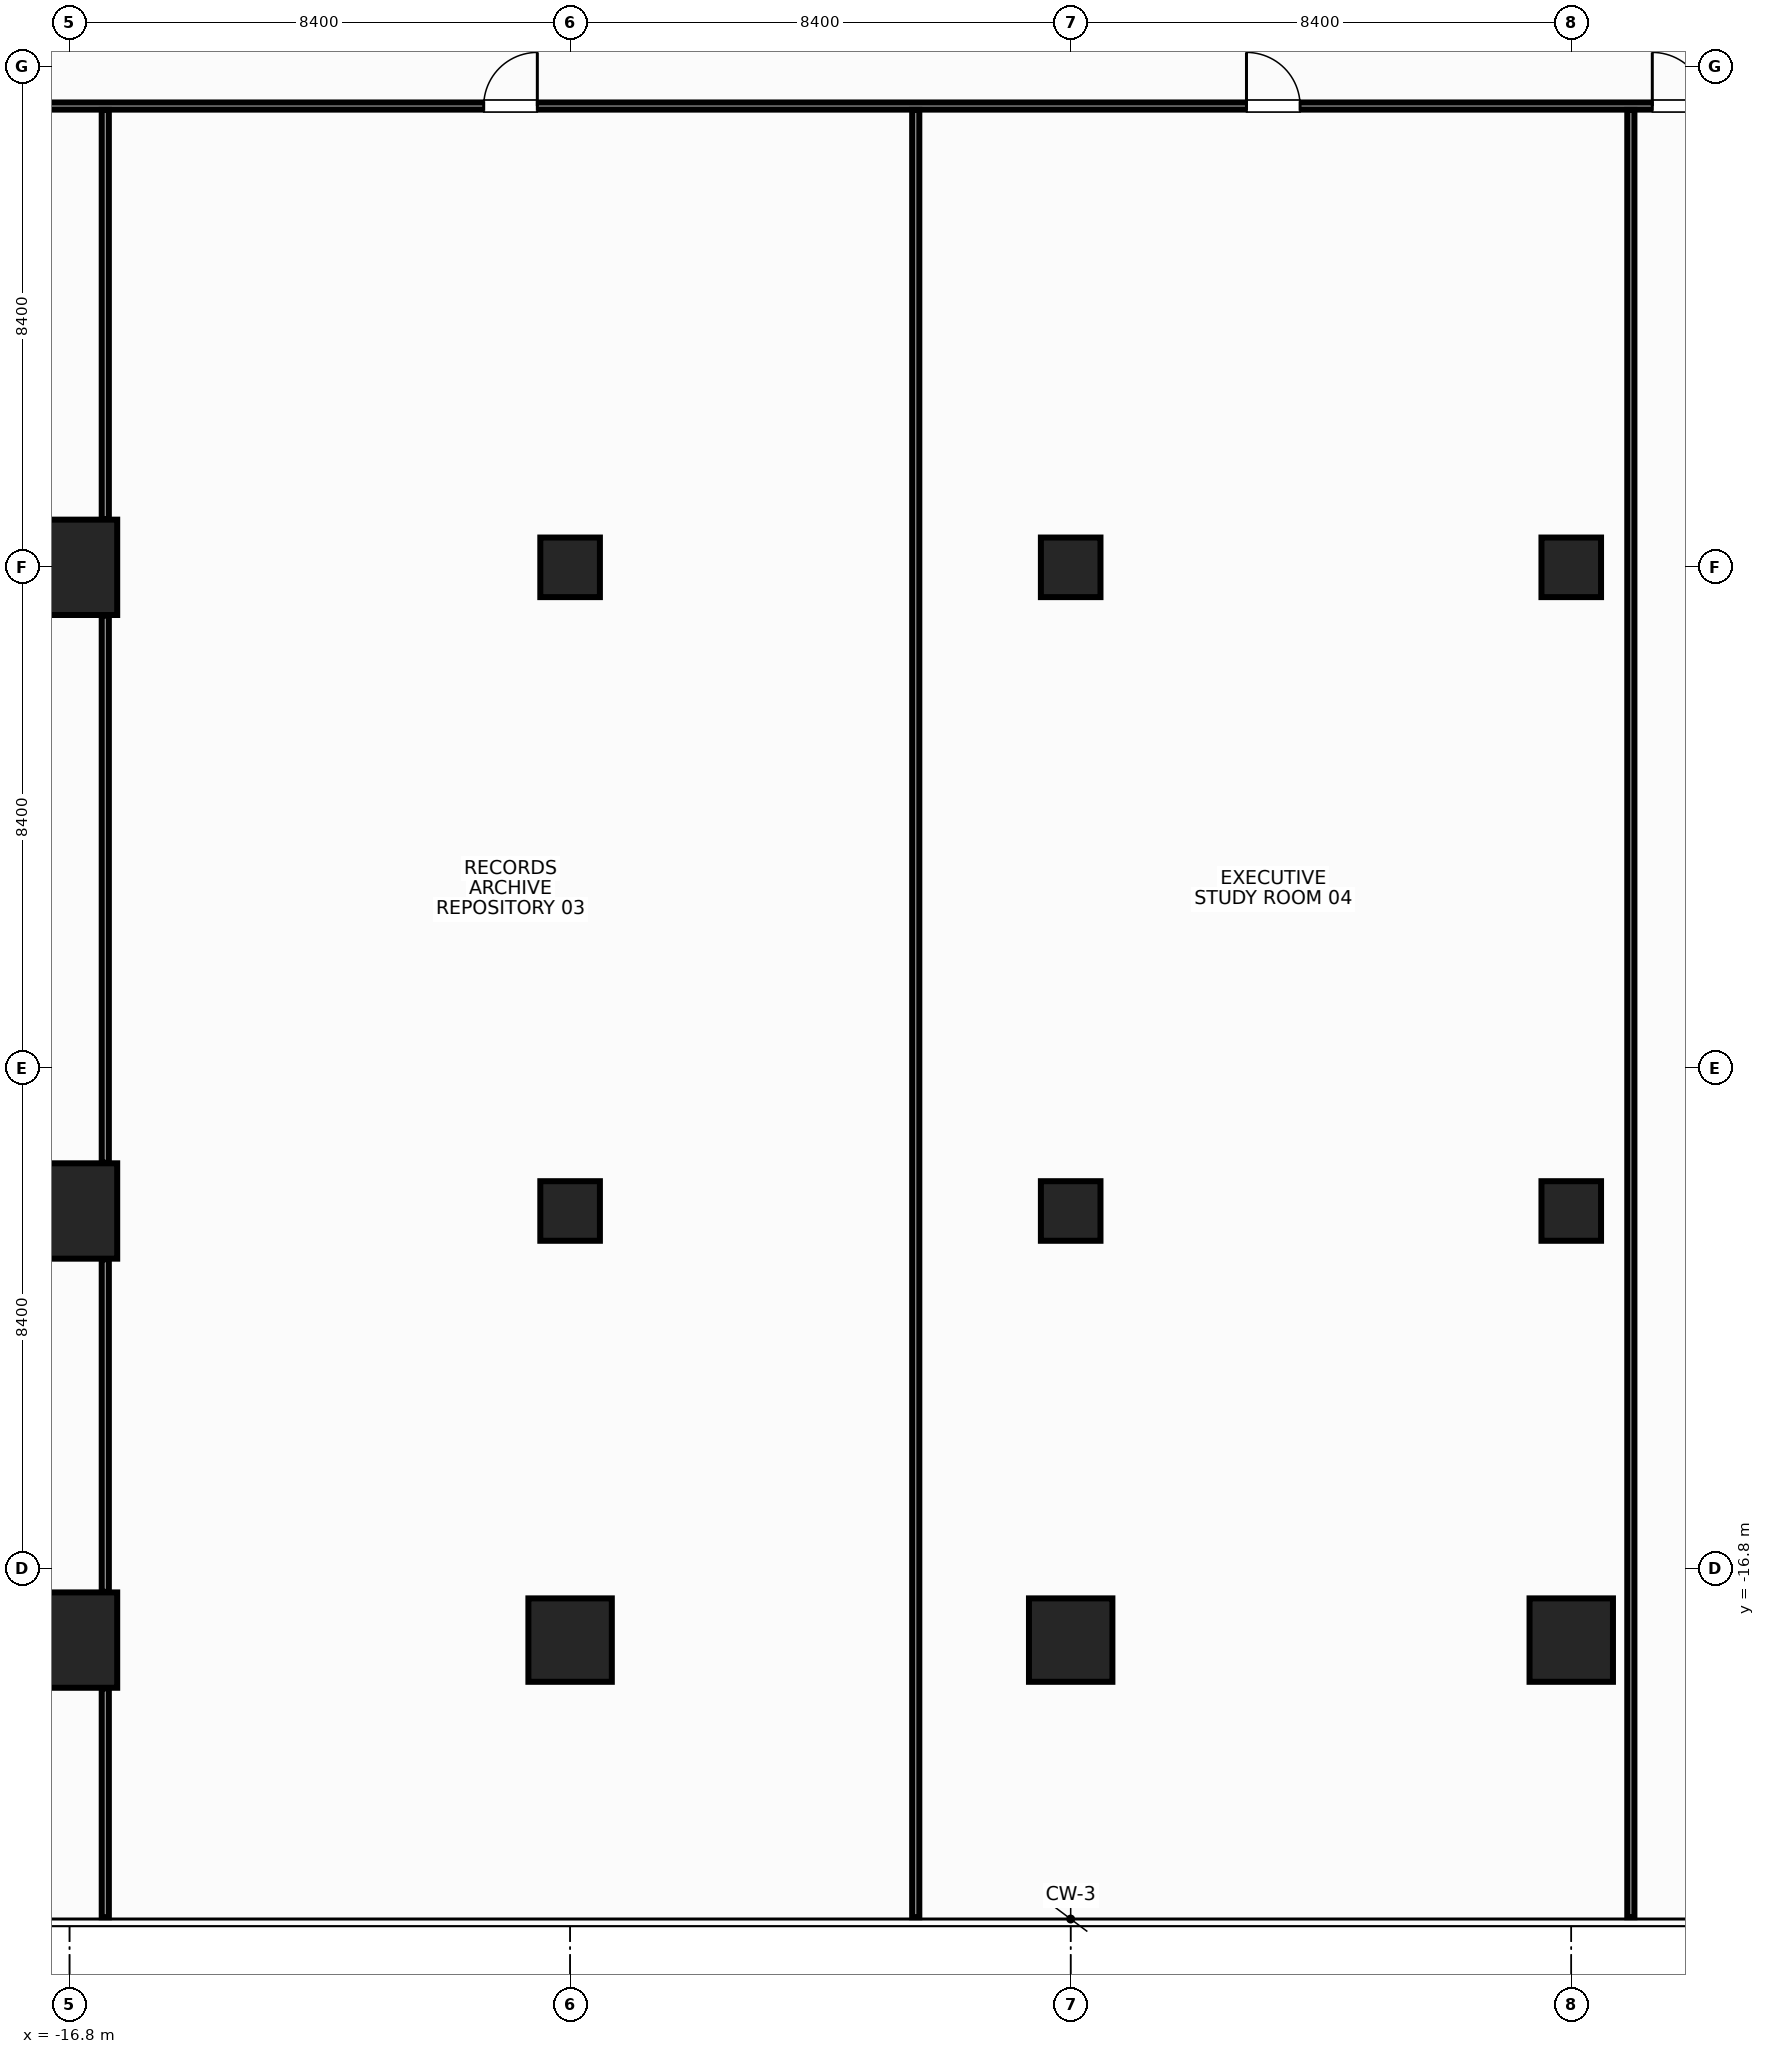
"""IFC4 building model, lengths in metres.
Left out: names, types, materials, properties, quantities, classifications, styles, units other than length and angle.
Written with IfcOpenShell. Run it as: python <this file> out.ifc"""

import sys

from ifc_helpers import new_model, si_unit, direction, frame, frame_2d, origin, origin_2d, place, context, subcontext, project, spatial, rectangle, hollow_rectangle, extrude, source, transform, mapped, element, fill, save


model = new_model("IFC4")
c1 = context("Model", 3, precision=1e-05, world=origin(), true_north=direction((0.0, 1.0)))
c2 = subcontext(c1, "Body", "Model", "MODEL_VIEW")
j1 = project(units=[si_unit("LENGTHUNIT", "METRE"), si_unit("PLANEANGLEUNIT", "RADIAN")], contexts=[c1])
p1 = place(None, origin())
s1 = spatial("IfcSite", under=j1, at=p1, CompositionType="ELEMENT")
p2 = place(p1, origin())
s2 = spatial("IfcBuilding", under=s1, at=p2, CompositionType="ELEMENT")
p3 = place(p2, frame((0.0, 0.0, 135.2)))
s3 = spatial("IfcBuildingStorey", under=s2, at=p3, CompositionType="ELEMENT", Elevation=135.2)
m1 = source(origin(), c2, "Body", "SweptSolid", [
    extrude(rectangle(XDim=1.6, YDim=1.6, at=origin_2d()), origin(), (0.0, 0.0, 1.0), 3.6),
])
for number, where, z_axis, x_axis in (
    (1, (-16.8, -18.0, 0.0), (0.0, 0.0, 1.0), (1.0, 0.0, 0.0)),
    (2, (-16.8, -10.8, 0.0), (0.0, 0.0, 1.0), (1.0, 0.0, 0.0)),
    (3, (-16.8, 0.0, 0.0), (0.0, 0.0, 1.0), (1.0, 0.0, 0.0)),
):
    element("IfcColumn", number, at=place(p3, frame(where, z_axis=z_axis, x_axis=x_axis)), inside=s3, PredefinedType="COLUMN", context=c2, shape_type="MappedRepresentation", body=[
        mapped(m1, transform((0.0, 0.0, 0.0), x_axis=(1.0, 0.0, 0.0), y_axis=(0.0, 1.0, 0.0), z_axis=(0.0, 0.0, 1.0), scale=1.0)),
    ])
m2 = source(origin(), c2, "Body", "SweptSolid", [
    extrude(rectangle(XDim=1.4, YDim=1.4, at=origin_2d()), origin(), (0.0, 0.0, 1.0), 3.6),
])
p4 = place(p3, frame((-8.4, -18.0, 0.0), z_axis=(0.0, 0.0, 1.0), x_axis=(1.0, 0.0, 0.0)))
e4 = element("IfcColumn", 4, at=p4, inside=s3, PredefinedType="COLUMN", context=c2, shape_type="MappedRepresentation", body=[
    mapped(m2, transform((0.0, 0.0, 0.0), x_axis=(1.0, 0.0, 0.0), y_axis=(0.0, 1.0, 0.0), z_axis=(0.0, 0.0, 1.0), scale=1.0)),
])
m3 = source(origin(), c2, "Body", "SweptSolid", [
    extrude(hollow_rectangle(XDim=1.0, YDim=1.0, WallThickness=0.045, at=origin_2d()), origin(), (0.0, 0.0, 1.0), 3.6),
])
for number, where, z_axis, x_axis in (
    (5, (-8.4, 0.0, 0.0), (0.0, 0.0, 1.0), (1.0, 0.0, 0.0)),
    (6, (-8.4, -10.8, 0.0), (0.0, 0.0, 1.0), (1.0, 0.0, 0.0)),
):
    element("IfcColumn", number, at=place(p3, frame(where, z_axis=z_axis, x_axis=x_axis)), inside=s3, PredefinedType="COLUMN", context=c2, shape_type="MappedRepresentation", body=[
        mapped(m3, transform((0.0, 0.0, 0.0), x_axis=(1.0, 0.0, 0.0), y_axis=(0.0, 1.0, 0.0), z_axis=(0.0, 0.0, 1.0), scale=1.0)),
    ])
p5 = place(p3, frame((8.4, -18.0, 0.0), z_axis=(0.0, 0.0, 1.0), x_axis=(1.0, 0.0, 0.0)))
e7 = element("IfcColumn", 7, at=p5, inside=s3, PredefinedType="COLUMN", context=c2, shape_type="MappedRepresentation", body=[
    mapped(m2, transform((0.0, 0.0, 0.0), x_axis=(1.0, 0.0, 0.0), y_axis=(0.0, 1.0, 0.0), z_axis=(0.0, 0.0, 1.0), scale=1.0)),
])
for number, where, z_axis, x_axis in (
    (8, (8.4, 0.0, 0.0), (0.0, 0.0, 1.0), (1.0, 0.0, 0.0)),
    (9, (8.4, -10.8, 0.0), (0.0, 0.0, 1.0), (1.0, 0.0, 0.0)),
):
    element("IfcColumn", number, at=place(p3, frame(where, z_axis=z_axis, x_axis=x_axis)), inside=s3, PredefinedType="COLUMN", context=c2, shape_type="MappedRepresentation", body=[
        mapped(m3, transform((0.0, 0.0, 0.0), x_axis=(1.0, 0.0, 0.0), y_axis=(0.0, 1.0, 0.0), z_axis=(0.0, 0.0, 1.0), scale=1.0)),
    ])
p6 = place(p3, frame((0.0, -18.0, 0.0), z_axis=(0.0, 0.0, 1.0), x_axis=(1.0, 0.0, 0.0)))
e10 = element("IfcColumn", 10, at=p6, inside=s3, PredefinedType="COLUMN", context=c2, shape_type="MappedRepresentation", body=[
    mapped(m2, transform((0.0, 0.0, 0.0), x_axis=(1.0, 0.0, 0.0), y_axis=(0.0, 1.0, 0.0), z_axis=(0.0, 0.0, 1.0), scale=1.0)),
])
m4 = source(origin(), c2, "Body", "SweptSolid", [
    extrude(rectangle(XDim=1.0, YDim=1.0, at=origin_2d()), origin(), (0.0, 0.0, 1.0), 3.6),
])
for number, where, z_axis, x_axis in (
    (11, (0.0, -10.8, 0.0), (0.0, 0.0, 1.0), (1.0, 0.0, 0.0)),
    (12, (0.0, 0.0, 0.0), (0.0, 0.0, 1.0), (1.0, 0.0, 0.0)),
):
    element("IfcColumn", number, at=place(p3, frame(where, z_axis=z_axis, x_axis=x_axis)), inside=s3, PredefinedType="COLUMN", context=c2, shape_type="MappedRepresentation", body=[
        mapped(m4, transform((0.0, 0.0, 0.0), x_axis=(1.0, 0.0, 0.0), y_axis=(0.0, 1.0, 0.0), z_axis=(0.0, 0.0, 1.0), scale=1.0)),
    ])
m5 = source(origin(), c2, "Body", "SweptSolid", [
    extrude(rectangle(XDim=31.6, YDim=0.12, at=frame_2d((15.8, 0.0))), origin(), (0.0, 0.0, 1.0), 2.765),
])
p7 = place(p3, frame((-20.52, 7.74, 0.0), z_axis=(0.0, 0.0, 1.0), x_axis=(1.0, 0.0, 0.0)))
e13 = element("IfcWall", 13, at=p7, inside=s3, PredefinedType="PARTITIONING", context=c2, shape_type="MappedRepresentation", body=[
    mapped(m5, transform((0.0, 0.0, 0.0), x_axis=(1.0, 0.0, 0.0), y_axis=(0.0, 1.0, 0.0), z_axis=(0.0, 0.0, 1.0), scale=1.0)),
])
p8 = place(p7, frame((1.74, 0.0, 0.0)))
e14 = element("IfcOpeningElement", 14, at=p8, cuts=e13, PredefinedType="OPENING", context=c2, shape_type="SweptSolid", body=[
    extrude(rectangle(XDim=0.9, YDim=2.15, at=frame_2d((0.45, 1.075))), frame((0.0, 0.072, 0.0), z_axis=(0.0, -1.0, 0.0), x_axis=(1.0, 0.0, 0.0)), (0.0, 0.0, 1.0), 0.144),
])
p9 = place(p7, frame((30.28, 0.0, 0.0)))
e15 = element("IfcOpeningElement", 15, at=p9, cuts=e13, PredefinedType="OPENING", context=c2, shape_type="SweptSolid", body=[
    extrude(rectangle(XDim=0.9, YDim=2.15, at=frame_2d((0.45, 1.075))), frame((0.0, 0.072, 0.0), z_axis=(0.0, -1.0, 0.0), x_axis=(1.0, 0.0, 0.0)), (0.0, 0.0, 1.0), 0.144),
])
p10 = place(p7, frame((10.67, 0.0, 0.0)))
e16 = element("IfcOpeningElement", 16, at=p10, cuts=e13, PredefinedType="OPENING", context=c2, shape_type="SweptSolid", body=[
    extrude(rectangle(XDim=0.9, YDim=2.15, at=frame_2d((0.45, 1.075))), frame((0.0, 0.072, 0.0), z_axis=(0.0, -1.0, 0.0), x_axis=(1.0, 0.0, 0.0)), (0.0, 0.0, 1.0), 0.144),
])
p11 = place(p7, frame((23.47, 0.0, 0.0)))
e17 = element("IfcOpeningElement", 17, at=p11, cuts=e13, PredefinedType="OPENING", context=c2, shape_type="SweptSolid", body=[
    extrude(rectangle(XDim=0.9, YDim=2.15, at=frame_2d((0.45, 1.075))), frame((0.0, 0.072, 0.0), z_axis=(0.0, -1.0, 0.0), x_axis=(1.0, 0.0, 0.0)), (0.0, 0.0, 1.0), 0.144),
])
m6 = source(origin(), c2, "Body", "SweptSolid", [
    extrude(rectangle(XDim=3.84, YDim=0.12, at=frame_2d((1.92, 0.0))), origin(), (0.0, 0.0, 1.0), 3.38),
])
p12 = place(p3, frame((-16.2, -22.65, 0.0), z_axis=(0.0, 0.0, 1.0), x_axis=(0.0, 1.0, 0.0)))
e18 = element("IfcWall", 18, at=p12, inside=s3, PredefinedType="PARTITIONING", context=c2, shape_type="MappedRepresentation", body=[
    mapped(m6, transform((0.0, 0.0, 0.0), x_axis=(1.0, 0.0, 0.0), y_axis=(0.0, 1.0, 0.0), z_axis=(0.0, 0.0, 1.0), scale=1.0)),
])
m7 = source(origin(), c2, "Body", "SweptSolid", [
    extrude(rectangle(XDim=5.58, YDim=0.12, at=frame_2d((2.79, 0.0))), origin(), (0.0, 0.0, 1.0), 3.38),
])
p13 = place(p3, frame((-16.2, -17.19, 0.0), z_axis=(0.0, 0.0, 1.0), x_axis=(0.0, 1.0, 0.0)))
e19 = element("IfcWall", 19, at=p13, inside=s3, PredefinedType="PARTITIONING", context=c2, shape_type="MappedRepresentation", body=[
    mapped(m7, transform((0.0, 0.0, 0.0), x_axis=(1.0, 0.0, 0.0), y_axis=(0.0, 1.0, 0.0), z_axis=(0.0, 0.0, 1.0), scale=1.0)),
])
m8 = source(origin(), c2, "Body", "SweptSolid", [
    extrude(rectangle(XDim=9.18, YDim=0.12, at=frame_2d((4.59, 0.0))), origin(), (0.0, 0.0, 1.0), 3.38),
])
p14 = place(p3, frame((-16.2, -9.99, 0.0), z_axis=(0.0, 0.0, 1.0), x_axis=(0.0, 1.0, 0.0)))
e20 = element("IfcWall", 20, at=p14, inside=s3, PredefinedType="PARTITIONING", context=c2, shape_type="MappedRepresentation", body=[
    mapped(m8, transform((0.0, 0.0, 0.0), x_axis=(1.0, 0.0, 0.0), y_axis=(0.0, 1.0, 0.0), z_axis=(0.0, 0.0, 1.0), scale=1.0)),
])
m9 = source(origin(), c2, "Body", "SweptSolid", [
    extrude(rectangle(XDim=6.865, YDim=0.12, at=frame_2d((3.433, 0.0))), origin(), (0.0, 0.0, 1.0), 2.665),
])
p15 = place(p3, frame((-16.2, 0.81, 0.0), z_axis=(0.0, 0.0, 1.0), x_axis=(0.0, 1.0, 0.0)))
e21 = element("IfcWall", 21, at=p15, inside=s3, PredefinedType="PARTITIONING", context=c2, shape_type="MappedRepresentation", body=[
    mapped(m9, transform((0.0, 0.0, 0.0), x_axis=(1.0, 0.0, 0.0), y_axis=(0.0, 1.0, 0.0), z_axis=(0.0, 0.0, 1.0), scale=1.0)),
])
m10 = source(origin(), c2, "Body", "SweptSolid", [
    extrude(rectangle(XDim=30.325, YDim=0.12, at=frame_2d((15.163, 0.0))), origin(), (0.0, 0.0, 1.0), 2.665),
])
for number, where, z_axis, x_axis in (
    (22, (-2.6, -22.65, 0.0), (0.0, 0.0, 1.0), (0.0, 1.0, 0.0)),
    (23, (9.4, -22.65, 0.0), (0.0, 0.0, 1.0), (0.0, 1.0, 0.0)),
):
    element("IfcWall", number, at=place(p3, frame(where, z_axis=z_axis, x_axis=x_axis)), inside=s3, PredefinedType="PARTITIONING", context=c2, shape_type="MappedRepresentation", body=[
        mapped(m10, transform((0.0, 0.0, 0.0), x_axis=(1.0, 0.0, 0.0), y_axis=(0.0, 1.0, 0.0), z_axis=(0.0, 0.0, 1.0), scale=1.0)),
    ])
m11 = source(origin(), c2, "Body", "SweptSolid", [
    extrude(rectangle(XDim=0.9, YDim=2.15, at=frame_2d((0.45, 1.075))), frame((0.0, 0.025, 0.0), z_axis=(0.0, -1.0, 0.0), x_axis=(1.0, 0.0, 0.0)), (0.0, 0.0, 1.0), 0.05),
])
p16 = place(p9, origin())
e24 = element("IfcDoor", 24, at=p16, inside=s3, OperationType="SINGLE_SWING_LEFT", PredefinedType="DOOR", context=c2, shape_type="MappedRepresentation", body=[
    mapped(m11, transform((0.0, 0.0, 0.0), x_axis=(1.0, 0.0, 0.0), y_axis=(0.0, 1.0, 0.0), z_axis=(0.0, 0.0, 1.0), scale=1.0)),
])
fill(e15, e24)
p17 = place(p10, origin())
e25 = element("IfcDoor", 25, at=p17, inside=s3, OperationType="SINGLE_SWING_RIGHT", PredefinedType="DOOR", context=c2, shape_type="MappedRepresentation", body=[
    mapped(m11, transform((0.0, 0.0, 0.0), x_axis=(1.0, 0.0, 0.0), y_axis=(0.0, 1.0, 0.0), z_axis=(0.0, 0.0, 1.0), scale=1.0)),
])
fill(e16, e25)
p18 = place(p11, origin())
e26 = element("IfcDoor", 26, at=p18, inside=s3, OperationType="SINGLE_SWING_LEFT", PredefinedType="DOOR", context=c2, shape_type="MappedRepresentation", body=[
    mapped(m11, transform((0.0, 0.0, 0.0), x_axis=(1.0, 0.0, 0.0), y_axis=(0.0, 1.0, 0.0), z_axis=(0.0, 0.0, 1.0), scale=1.0)),
])
fill(e17, e26)
save(model, sys.argv[1])
